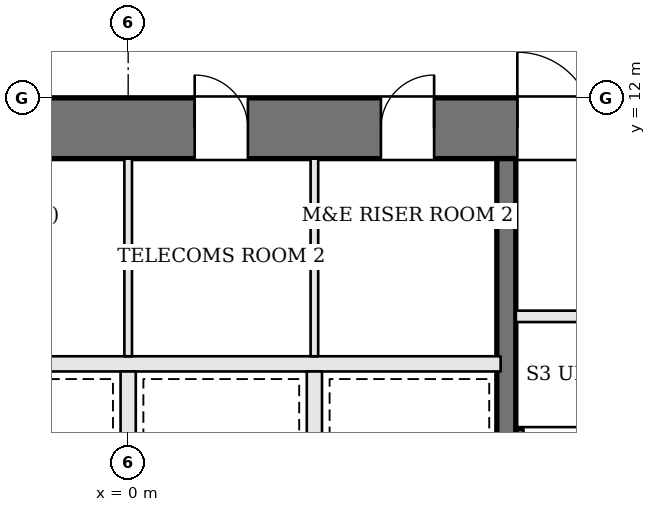
"""IFC4 building model, lengths in metres.
Left out: names, types, materials, properties, quantities, classifications, styles, units other than length and angle.
Written with IfcOpenShell. Run it as: python <this file> out.ifc"""

import sys

from ifc_helpers import new_model, si_unit, direction, frame, frame_2d, origin, place, context, subcontext, project, spatial, rectangle, extrude, element, fill, save


model = new_model("IFC4")
c1 = context("Model", 3, precision=1e-05, world=origin(), true_north=direction((0.0, 1.0)))
c2 = subcontext(c1, "Body", "Model", "MODEL_VIEW")
j1 = project(units=[si_unit("LENGTHUNIT", "METRE"), si_unit("PLANEANGLEUNIT", "RADIAN")], contexts=[c1])
p1 = place(None, origin())
s1 = spatial("IfcSite", under=j1, at=p1, CompositionType="ELEMENT")
p2 = place(p1, origin())
s2 = spatial("IfcBuilding", under=s1, at=p2, CompositionType="ELEMENT")
p3 = place(p2, frame((0.0, 0.0, 193.5)))
s3 = spatial("IfcBuildingStorey", under=s2, at=p3, CompositionType="ELEMENT", Elevation=193.5)
p4 = place(p3, frame((-13.0, 11.6, 0.0), z_axis=(0.0, 0.0, 1.0), x_axis=(1.0, 0.0, 0.0)))
e1 = element("IfcWall", 1, at=p4, inside=s3, PredefinedType="SHEAR", context=c2, shape_type="SweptSolid", body=[
    extrude(rectangle(XDim=26.0, YDim=0.8, at=frame_2d((13.0, 0.0))), origin(), (0.0, 0.0, 1.0), 3.9),
])
p5 = place(p4, frame((8.575, 0.0, 0.0)))
e2 = element("IfcOpeningElement", 2, at=p5, cuts=e1, PredefinedType="OPENING", context=c2, shape_type="SweptSolid", body=[
    extrude(rectangle(XDim=0.7, YDim=2.1, at=frame_2d((0.35, 1.05))), frame((0.0, 0.41, 0.0), z_axis=(0.0, -1.0, 0.0), x_axis=(1.0, 0.0, 0.0)), (0.0, 0.0, 1.0), 0.82),
])
p6 = place(p4, frame((10.875, 0.0, 0.0)))
e3 = element("IfcOpeningElement", 3, at=p6, cuts=e1, PredefinedType="OPENING", context=c2, shape_type="SweptSolid", body=[
    extrude(rectangle(XDim=1.0, YDim=2.1, at=frame_2d((0.5, 1.05))), frame((0.0, 0.41, 0.0), z_axis=(0.0, -1.0, 0.0), x_axis=(1.0, 0.0, 0.0)), (0.0, 0.0, 1.0), 0.82),
])
p7 = place(p4, frame((13.875, 0.0, 0.0)))
e4 = element("IfcOpeningElement", 4, at=p7, cuts=e1, PredefinedType="OPENING", context=c2, shape_type="SweptSolid", body=[
    extrude(rectangle(XDim=0.7, YDim=2.1, at=frame_2d((0.35, 1.05))), frame((0.0, 0.41, 0.0), z_axis=(0.0, -1.0, 0.0), x_axis=(1.0, 0.0, 0.0)), (0.0, 0.0, 1.0), 0.82),
])
p8 = place(p4, frame((16.325, 0.0, 0.0)))
e5 = element("IfcOpeningElement", 5, at=p8, cuts=e1, PredefinedType="OPENING", context=c2, shape_type="SweptSolid", body=[
    extrude(rectangle(XDim=0.7, YDim=2.1, at=frame_2d((0.35, 1.05))), frame((0.0, 0.41, 0.0), z_axis=(0.0, -1.0, 0.0), x_axis=(1.0, 0.0, 0.0)), (0.0, 0.0, 1.0), 0.82),
])
p9 = place(p4, frame((6.88, 0.0, 0.0)))
e6 = element("IfcOpeningElement", 6, at=p9, cuts=e1, PredefinedType="OPENING", context=c2, shape_type="SweptSolid", body=[
    extrude(rectangle(XDim=1.0, YDim=2.1, at=frame_2d((0.5, 1.05))), frame((0.0, 0.41, 0.0), z_axis=(0.0, -1.0, 0.0), x_axis=(1.0, 0.0, 0.0)), (0.0, 0.0, 1.0), 0.82),
])
p10 = place(p4, frame((18.12, 0.0, 0.0)))
e7 = element("IfcOpeningElement", 7, at=p10, cuts=e1, PredefinedType="OPENING", context=c2, shape_type="SweptSolid", body=[
    extrude(rectangle(XDim=1.0, YDim=2.1, at=frame_2d((0.5, 1.05))), frame((0.0, 0.41, 0.0), z_axis=(0.0, -1.0, 0.0), x_axis=(1.0, 0.0, 0.0)), (0.0, 0.0, 1.0), 0.82),
])
p11 = place(p3, frame((6.4, 9.125, 0.0), z_axis=(0.0, 0.0, 1.0), x_axis=(-1.0, 0.0, 0.0)))
e8 = element("IfcWall", 8, at=p11, inside=s3, PredefinedType="SOLIDWALL", context=c2, shape_type="SweptSolid", body=[
    extrude(rectangle(XDim=1.3, YDim=0.15, at=frame_2d((0.65, 0.0))), origin(), (0.0, 0.0, 1.0), 3.7),
])
p12 = place(p3, frame((12.2, 7.525, 0.0), z_axis=(0.0, 0.0, 1.0), x_axis=(-1.0, 0.0, 0.0)))
e9 = element("IfcWall", 9, at=p12, inside=s3, PredefinedType="SOLIDWALL", context=c2, shape_type="SweptSolid", body=[
    extrude(rectangle(XDim=7.1, YDim=0.25, at=frame_2d((3.55, 0.0))), origin(), (0.0, 0.0, 1.0), 3.7),
])
p13 = place(p12, frame((5.8, 0.0, 0.0)))
e10 = element("IfcOpeningElement", 10, at=p13, cuts=e9, PredefinedType="OPENING", context=c2, shape_type="SweptSolid", body=[
    extrude(rectangle(XDim=1.2, YDim=2.1, at=frame_2d((0.6, 1.05))), frame((0.0, 0.135, 0.0), z_axis=(0.0, -1.0, 0.0), x_axis=(1.0, 0.0, 0.0)), (0.0, 0.0, 1.0), 0.27),
])
p14 = place(p3, frame((4.975, 11.2, 0.0), z_axis=(0.0, 0.0, 1.0), x_axis=(0.0, -1.0, 0.0)))
e11 = element("IfcWall", 11, at=p14, inside=s3, PredefinedType="SOLIDWALL", context=c2, shape_type="SweptSolid", body=[
    extrude(rectangle(XDim=13.4, YDim=0.25, at=frame_2d((6.7, 0.0))), origin(), (0.0, 0.0, 1.0), 3.7),
])
p15 = place(p14, frame((5.25, 0.0, 0.0)))
e12 = element("IfcOpeningElement", 12, at=p15, cuts=e11, PredefinedType="OPENING", context=c2, shape_type="SweptSolid", body=[
    extrude(rectangle(XDim=1.2, YDim=2.1, at=frame_2d((0.6, 1.05))), frame((0.0, 0.135, 0.0), z_axis=(0.0, -1.0, 0.0), x_axis=(1.0, 0.0, 0.0)), (0.0, 0.0, 1.0), 0.27),
])
p16 = place(p3, frame((-4.9, 8.5, 0.0), z_axis=(0.0, 0.0, 1.0), x_axis=(1.0, 0.0, 0.0)))
e13 = element("IfcWall", 13, at=p16, inside=s3, PredefinedType="SOLIDWALL", context=c2, shape_type="SweptSolid", body=[
    extrude(rectangle(XDim=9.8, YDim=0.2, at=frame_2d((4.9, 0.0))), origin(), (0.0, 0.0, 1.0), 3.7),
])
for number, where, z_axis, x_axis in (
    (14, (0.0, 6.2, 0.0), (0.0, 0.0, 1.0), (0.0, 1.0, 0.0)),
    (15, (2.45, 6.2, 0.0), (0.0, 0.0, 1.0), (0.0, 1.0, 0.0)),
):
    element("IfcWall", number, at=place(p3, frame(where, z_axis=z_axis, x_axis=x_axis)), inside=s3, PredefinedType="SOLIDWALL", context=c2, shape_type="SweptSolid", body=[
        extrude(rectangle(XDim=2.2, YDim=0.2, at=frame_2d((1.1, 0.0))), origin(), (0.0, 0.0, 1.0), 3.7),
    ])
for number, where, z_axis, x_axis in (
    (16, (0.0, 8.6, 0.0), (0.0, 0.0, 1.0), (0.0, 1.0, 0.0)),
    (17, (2.45, 8.6, 0.0), (0.0, 0.0, 1.0), (0.0, 1.0, 0.0)),
):
    element("IfcWall", number, at=place(p3, frame(where, z_axis=z_axis, x_axis=x_axis)), inside=s3, PredefinedType="PARTITIONING", context=c2, shape_type="SweptSolid", body=[
        extrude(rectangle(XDim=2.6, YDim=0.1, at=frame_2d((1.3, 0.0))), origin(), (0.0, 0.0, 1.0), 3.7),
    ])
p17 = place(p7, origin())
e18 = element("IfcDoor", 18, at=p17, inside=s3, OperationType="SINGLE_SWING_LEFT", PredefinedType="DOOR", context=c2, shape_type="SweptSolid", body=[
    extrude(rectangle(XDim=0.7, YDim=2.1, at=frame_2d((0.35, 1.05))), frame((0.0, 0.025, 0.0), z_axis=(0.0, -1.0, 0.0), x_axis=(1.0, 0.0, 0.0)), (0.0, 0.0, 1.0), 0.05),
])
fill(e4, e18)
p18 = place(p8, origin())
e19 = element("IfcDoor", 19, at=p18, inside=s3, OperationType="SINGLE_SWING_RIGHT", PredefinedType="DOOR", context=c2, shape_type="SweptSolid", body=[
    extrude(rectangle(XDim=0.7, YDim=2.1, at=frame_2d((0.35, 1.05))), frame((0.0, 0.025, 0.0), z_axis=(0.0, -1.0, 0.0), x_axis=(1.0, 0.0, 0.0)), (0.0, 0.0, 1.0), 0.05),
])
fill(e5, e19)
p19 = place(p10, origin())
e20 = element("IfcDoor", 20, at=p19, inside=s3, OperationType="SINGLE_SWING_LEFT", PredefinedType="DOOR", context=c2, shape_type="SweptSolid", body=[
    extrude(rectangle(XDim=1.0, YDim=2.1, at=frame_2d((0.5, 1.05))), frame((0.0, 0.025, 0.0), z_axis=(0.0, -1.0, 0.0), x_axis=(1.0, 0.0, 0.0)), (0.0, 0.0, 1.0), 0.05),
])
fill(e7, e20)
save(model, sys.argv[1])
